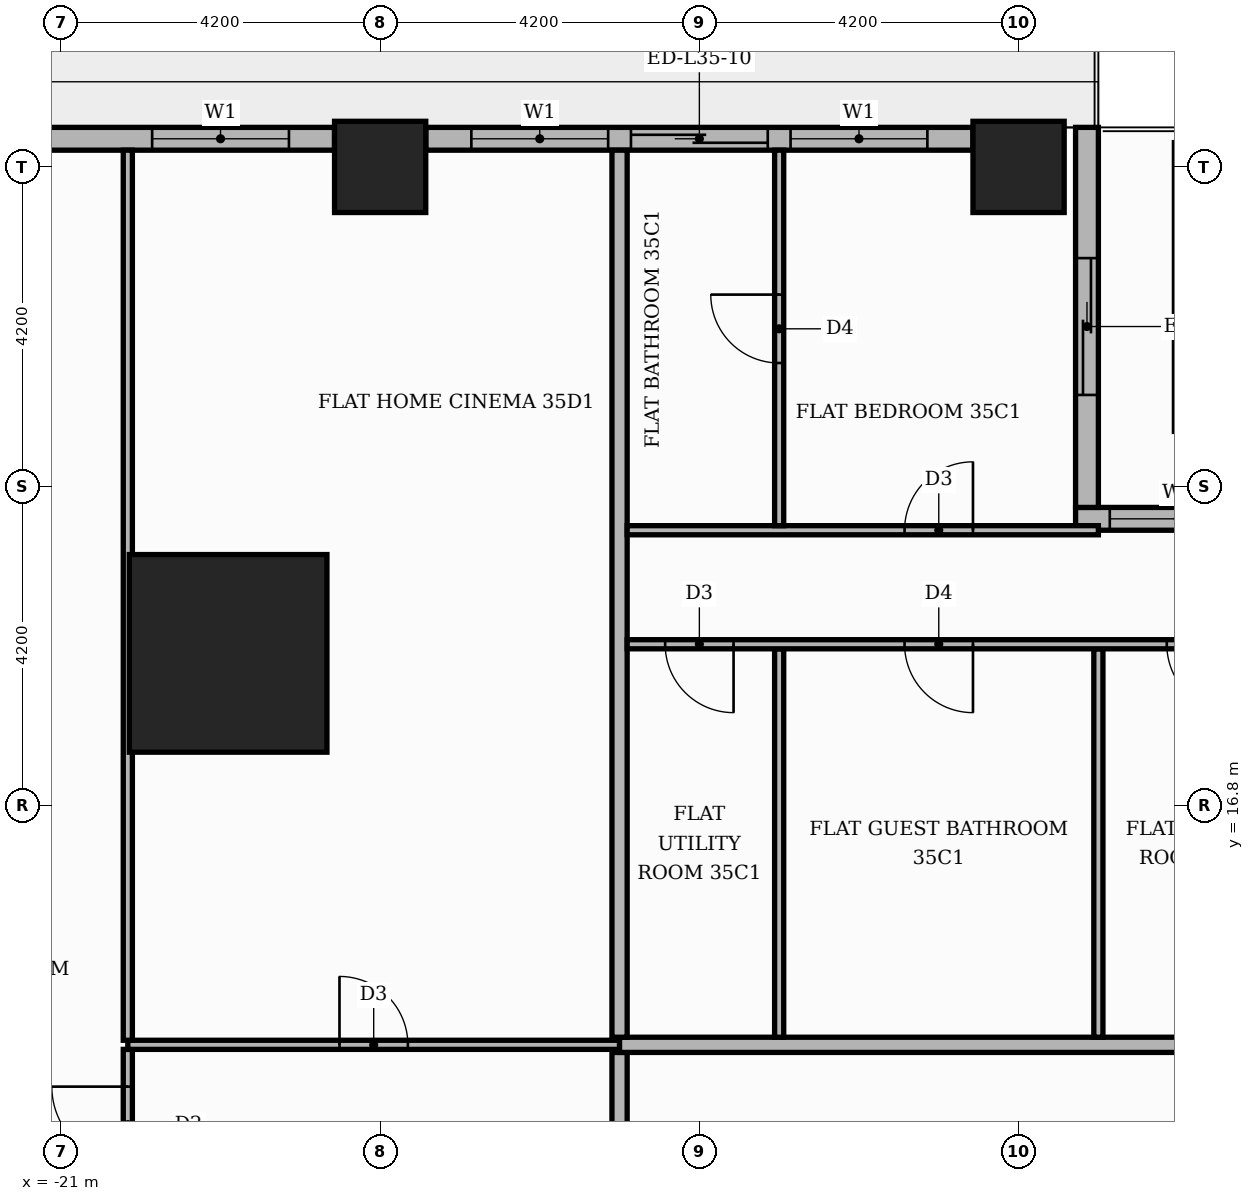
"""IFC4 building model, lengths in metres.
Left out: names, types, materials, properties, quantities, classifications, styles, units other than length and angle.
Written with IfcOpenShell. Run it as: python <this file> out.ifc"""

import sys

from ifc_helpers import new_model, si_unit, direction, frame, frame_2d, origin, origin_2d, place, context, subcontext, project, spatial, rectangle, extrude, element, fill, save


model = new_model("IFC4")
c1 = context("Model", 3, precision=1e-05, world=origin(), true_north=direction((0.0, 1.0)))
c2 = subcontext(c1, "Body", "Model", "MODEL_VIEW")
j1 = project(units=[si_unit("LENGTHUNIT", "METRE"), si_unit("PLANEANGLEUNIT", "RADIAN")], contexts=[c1])
p1 = place(None, origin())
s1 = spatial("IfcSite", under=j1, at=p1, CompositionType="ELEMENT")
p2 = place(p1, origin())
s2 = spatial("IfcBuilding", under=s1, at=p2, CompositionType="ELEMENT")
p3 = place(p2, frame((0.0, 0.0, 149.4)))
s3 = spatial("IfcBuildingStorey", under=s2, at=p3, CompositionType="ELEMENT", Elevation=149.4)
p4 = place(p3, frame((-18.8, 18.8, 0.0), z_axis=(0.0, 0.0, 1.0), x_axis=(1.0, 0.0, 0.0)))
e1 = element("IfcColumn", 1, at=p4, inside=s3, PredefinedType="COLUMN", context=c2, shape_type="SweptSolid", body=[
    extrude(rectangle(XDim=2.6, YDim=2.6, at=origin_2d()), origin(), (0.0, 0.0, 1.0), 3.9),
])
for number, where, z_axis, x_axis in (
    (2, (-8.4, 25.2, 0.0), (0.0, 0.0, 1.0), (1.0, 0.0, 0.0)),
    (3, (-16.8, 25.2, 0.0), (0.0, 0.0, 1.0), (1.0, 0.0, 0.0)),
):
    element("IfcColumn", number, at=place(p3, frame(where, z_axis=z_axis, x_axis=x_axis)), inside=s3, PredefinedType="COLUMN", context=c2, shape_type="SweptSolid", body=[
        extrude(rectangle(XDim=1.2, YDim=1.2, at=origin_2d()), origin(), (0.0, 0.0, 1.0), 3.9),
    ])
p5 = place(p3, frame((7.35, 20.57, 0.0), z_axis=(0.0, 0.0, 1.0), x_axis=(-1.0, 0.0, 0.0)))
e4 = element("IfcWall", 4, at=p5, inside=s3, PredefinedType="STANDARD", context=c2, shape_type="SweptSolid", body=[
    extrude(rectangle(XDim=15.0, YDim=0.3, at=frame_2d((7.5, 0.0))), origin(), (0.0, 0.0, 1.0), 3.48),
])
p6 = place(p5, frame((0.15, 0.0, 0.9)))
e5 = element("IfcOpeningElement", 5, at=p6, cuts=e4, PredefinedType="OPENING", context=c2, shape_type="SweptSolid", body=[
    extrude(rectangle(XDim=6.0, YDim=2.1, at=frame_2d((3.0, 1.05))), frame((0.0, 0.16, 0.0), z_axis=(0.0, -1.0, 0.0), x_axis=(1.0, 0.0, 0.0)), (0.0, 0.0, 1.0), 0.32),
])
p7 = place(p5, frame((6.45, 0.0, 0.9)))
e6 = element("IfcOpeningElement", 6, at=p7, cuts=e4, PredefinedType="OPENING", context=c2, shape_type="SweptSolid", body=[
    extrude(rectangle(XDim=6.0, YDim=2.1, at=frame_2d((3.0, 1.05))), frame((0.0, 0.16, 0.0), z_axis=(0.0, -1.0, 0.0), x_axis=(1.0, 0.0, 0.0)), (0.0, 0.0, 1.0), 0.32),
])
p8 = place(p5, frame((12.75, 0.0, 0.9)))
e7 = element("IfcOpeningElement", 7, at=p8, cuts=e4, PredefinedType="OPENING", context=c2, shape_type="SweptSolid", body=[
    extrude(rectangle(XDim=1.8, YDim=2.1, at=frame_2d((0.9, 1.05))), frame((0.0, 0.16, 0.0), z_axis=(0.0, -1.0, 0.0), x_axis=(1.0, 0.0, 0.0)), (0.0, 0.0, 1.0), 0.32),
])
p9 = place(p3, frame((-7.5, 20.72, 0.0), z_axis=(0.0, 0.0, 1.0), x_axis=(0.0, 1.0, 0.0)))
e8 = element("IfcWall", 8, at=p9, inside=s3, PredefinedType="STANDARD", context=c2, shape_type="SweptSolid", body=[
    extrude(rectangle(XDim=5.0, YDim=0.3, at=frame_2d((2.5, 0.0))), origin(), (0.0, 0.0, 1.0), 3.48),
])
p10 = place(p9, frame((1.48, 0.0, 0.0)))
e9 = element("IfcOpeningElement", 9, at=p10, cuts=e8, PredefinedType="OPENING", context=c2, shape_type="SweptSolid", body=[
    extrude(rectangle(XDim=1.8, YDim=2.4, at=frame_2d((0.9, 1.2))), frame((0.0, 0.16, 0.0), z_axis=(0.0, -1.0, 0.0), x_axis=(1.0, 0.0, 0.0)), (0.0, 0.0, 1.0), 0.32),
])
p11 = place(p3, frame((-9.0, 25.57, 0.0), z_axis=(0.0, 0.0, 1.0), x_axis=(-1.0, 0.0, 0.0)))
e10 = element("IfcWall", 10, at=p11, inside=s3, PredefinedType="STANDARD", context=c2, shape_type="SweptSolid", body=[
    extrude(rectangle(XDim=7.2, YDim=0.3, at=frame_2d((3.6, 0.0))), origin(), (0.0, 0.0, 1.0), 3.48),
])
p12 = place(p11, frame((0.6, 0.0, 0.9)))
e11 = element("IfcOpeningElement", 11, at=p12, cuts=e10, PredefinedType="OPENING", context=c2, shape_type="SweptSolid", body=[
    extrude(rectangle(XDim=1.8, YDim=2.1, at=frame_2d((0.9, 1.05))), frame((0.0, 0.16, 0.0), z_axis=(0.0, -1.0, 0.0), x_axis=(1.0, 0.0, 0.0)), (0.0, 0.0, 1.0), 0.32),
])
p13 = place(p11, frame((2.7, 0.0, 0.0)))
e12 = element("IfcOpeningElement", 12, at=p13, cuts=e10, PredefinedType="OPENING", context=c2, shape_type="SweptSolid", body=[
    extrude(rectangle(XDim=1.8, YDim=2.4, at=frame_2d((0.9, 1.2))), frame((0.0, 0.16, 0.0), z_axis=(0.0, -1.0, 0.0), x_axis=(1.0, 0.0, 0.0)), (0.0, 0.0, 1.0), 0.32),
])
p14 = place(p11, frame((4.8, 0.0, 0.9)))
e13 = element("IfcOpeningElement", 13, at=p14, cuts=e10, PredefinedType="OPENING", context=c2, shape_type="SweptSolid", body=[
    extrude(rectangle(XDim=1.8, YDim=2.1, at=frame_2d((0.9, 1.05))), frame((0.0, 0.16, 0.0), z_axis=(0.0, -1.0, 0.0), x_axis=(1.0, 0.0, 0.0)), (0.0, 0.0, 1.0), 0.32),
])
p15 = place(p3, frame((-17.4, 25.57, 0.0), z_axis=(0.0, 0.0, 1.0), x_axis=(-1.0, 0.0, 0.0)))
e14 = element("IfcWall", 14, at=p15, inside=s3, PredefinedType="STANDARD", context=c2, shape_type="SweptSolid", body=[
    extrude(rectangle(XDim=4.32, YDim=0.3, at=frame_2d((2.16, 0.0))), origin(), (0.0, 0.0, 1.0), 3.48),
])
p16 = place(p15, frame((0.6, 0.0, 0.9)))
e15 = element("IfcOpeningElement", 15, at=p16, cuts=e14, PredefinedType="OPENING", context=c2, shape_type="SweptSolid", body=[
    extrude(rectangle(XDim=1.8, YDim=2.1, at=frame_2d((0.9, 1.05))), frame((0.0, 0.16, 0.0), z_axis=(0.0, -1.0, 0.0), x_axis=(1.0, 0.0, 0.0)), (0.0, 0.0, 1.0), 0.32),
])
p17 = place(p3, frame((-13.65, 11.1, 0.0), z_axis=(0.0, 0.0, 1.0), x_axis=(0.0, 1.0, 0.0)))
e16 = element("IfcWall", 16, at=p17, inside=s3, PredefinedType="PARTITIONING", context=c2, shape_type="SweptSolid", body=[
    extrude(rectangle(XDim=2.45, YDim=0.2, at=frame_2d((1.225, 0.0))), origin(), (0.0, 0.0, 1.0), 3.48),
])
p18 = place(p3, frame((-20.12, 11.61, 0.0), z_axis=(0.0, 0.0, 1.0), x_axis=(0.0, 1.0, 0.0)))
e17 = element("IfcWall", 17, at=p18, inside=s3, PredefinedType="PARTITIONING", context=c2, shape_type="SweptSolid", body=[
    extrude(rectangle(XDim=1.98, YDim=0.12, at=frame_2d((0.99, 0.0))), origin(), (0.0, 0.0, 1.0), 3.48),
])
p19 = place(p18, frame((0.49, 0.0, 0.0)))
e18 = element("IfcOpeningElement", 18, at=p19, cuts=e17, PredefinedType="OPENING", context=c2, shape_type="SweptSolid", body=[
    extrude(rectangle(XDim=1.0, YDim=2.1, at=frame_2d((0.5, 1.05))), frame((0.0, 0.07, 0.0), z_axis=(0.0, -1.0, 0.0), x_axis=(1.0, 0.0, 0.0)), (0.0, 0.0, 1.0), 0.14),
])
p20 = place(p3, frame((-20.12, 13.65, 0.0), z_axis=(0.0, 0.0, 1.0), x_axis=(1.0, 0.0, 0.0)))
e19 = element("IfcWall", 19, at=p20, inside=s3, PredefinedType="PARTITIONING", context=c2, shape_type="SweptSolid", body=[
    extrude(rectangle(XDim=6.47, YDim=0.12, at=frame_2d((3.235, 0.0))), origin(), (0.0, 0.0, 1.0), 3.48),
])
p21 = place(p20, frame((2.785, 0.0, 0.0)))
e20 = element("IfcOpeningElement", 20, at=p21, cuts=e19, PredefinedType="OPENING", context=c2, shape_type="SweptSolid", body=[
    extrude(rectangle(XDim=0.9, YDim=2.1, at=frame_2d((0.45, 1.05))), frame((0.0, 0.07, 0.0), z_axis=(0.0, -1.0, 0.0), x_axis=(1.0, 0.0, 0.0)), (0.0, 0.0, 1.0), 0.14),
])
p22 = place(p3, frame((-13.65, 13.65, 0.0), z_axis=(0.0, 0.0, 1.0), x_axis=(1.0, 0.0, 0.0)))
e21 = element("IfcWall", 21, at=p22, inside=s3, PredefinedType="PARTITIONING", context=c2, shape_type="SweptSolid", body=[
    extrude(rectangle(XDim=39.07, YDim=0.2, at=frame_2d((19.535, 0.0))), origin(), (0.0, 0.0, 1.0), 3.48),
])
p23 = place(p22, frame((23.6, 0.0, 0.0)))
e22 = element("IfcOpeningElement", 22, at=p23, cuts=e21, PredefinedType="OPENING", context=c2, shape_type="SweptSolid", body=[
    extrude(rectangle(XDim=1.1, YDim=2.4, at=frame_2d((0.55, 1.2))), frame((0.0, 0.11, 0.0), z_axis=(0.0, -1.0, 0.0), x_axis=(1.0, 0.0, 0.0)), (0.0, 0.0, 1.0), 0.22),
])
p24 = place(p3, frame((-20.12, 13.71, 0.0), z_axis=(0.0, 0.0, 1.0), x_axis=(0.0, 1.0, 0.0)))
e23 = element("IfcWall", 23, at=p24, inside=s3, PredefinedType="PARTITIONING", context=c2, shape_type="SweptSolid", body=[
    extrude(rectangle(XDim=11.71, YDim=0.12, at=frame_2d((5.855, 0.0))), origin(), (0.0, 0.0, 1.0), 3.48),
])
p25 = place(p3, frame((-13.65, 13.75, 0.0), z_axis=(0.0, 0.0, 1.0), x_axis=(0.0, 1.0, 0.0)))
e24 = element("IfcWall", 24, at=p25, inside=s3, PredefinedType="PARTITIONING", context=c2, shape_type="SweptSolid", body=[
    extrude(rectangle(XDim=11.67, YDim=0.2, at=frame_2d((5.835, 0.0))), origin(), (0.0, 0.0, 1.0), 3.48),
])
for number, where, z_axis, x_axis in (
    (25, (-11.55, 13.75, 0.0), (0.0, 0.0, 1.0), (0.0, 1.0, 0.0)),
    (26, (-7.35, 13.75, 0.0), (0.0, 0.0, 1.0), (0.0, 1.0, 0.0)),
):
    element("IfcWall", number, at=place(p3, frame(where, z_axis=z_axis, x_axis=x_axis)), inside=s3, PredefinedType="PARTITIONING", context=c2, shape_type="SweptSolid", body=[
        extrude(rectangle(XDim=5.11, YDim=0.12, at=frame_2d((2.555, 0.0))), origin(), (0.0, 0.0, 1.0), 3.48),
    ])
p26 = place(p3, frame((-13.55, 18.92, 0.0), z_axis=(0.0, 0.0, 1.0), x_axis=(1.0, 0.0, 0.0)))
e27 = element("IfcWall", 27, at=p26, inside=s3, PredefinedType="PARTITIONING", context=c2, shape_type="SweptSolid", body=[
    extrude(rectangle(XDim=20.9, YDim=0.12, at=frame_2d((10.45, 0.0))), origin(), (0.0, 0.0, 1.0), 3.48),
])
p27 = place(p26, frame((17.3, 0.0, 0.0)))
e28 = element("IfcOpeningElement", 28, at=p27, cuts=e27, PredefinedType="OPENING", context=c2, shape_type="SweptSolid", body=[
    extrude(rectangle(XDim=0.9, YDim=2.1, at=frame_2d((0.45, 1.05))), frame((0.0, 0.07, 0.0), z_axis=(0.0, -1.0, 0.0), x_axis=(1.0, 0.0, 0.0)), (0.0, 0.0, 1.0), 0.14),
])
p28 = place(p26, frame((11.3, 0.0, 0.0)))
e29 = element("IfcOpeningElement", 29, at=p28, cuts=e27, PredefinedType="OPENING", context=c2, shape_type="SweptSolid", body=[
    extrude(rectangle(XDim=0.9, YDim=2.1, at=frame_2d((0.45, 1.05))), frame((0.0, 0.07, 0.0), z_axis=(0.0, -1.0, 0.0), x_axis=(1.0, 0.0, 0.0)), (0.0, 0.0, 1.0), 0.14),
])
p29 = place(p26, frame((7.1, 0.0, 0.0)))
e30 = element("IfcOpeningElement", 30, at=p29, cuts=e27, PredefinedType="OPENING", context=c2, shape_type="SweptSolid", body=[
    extrude(rectangle(XDim=0.9, YDim=2.1, at=frame_2d((0.45, 1.05))), frame((0.0, 0.07, 0.0), z_axis=(0.0, -1.0, 0.0), x_axis=(1.0, 0.0, 0.0)), (0.0, 0.0, 1.0), 0.14),
])
p30 = place(p26, frame((3.65, 0.0, 0.0)))
e31 = element("IfcOpeningElement", 31, at=p30, cuts=e27, PredefinedType="OPENING", context=c2, shape_type="SweptSolid", body=[
    extrude(rectangle(XDim=0.9, YDim=2.1, at=frame_2d((0.45, 1.05))), frame((0.0, 0.07, 0.0), z_axis=(0.0, -1.0, 0.0), x_axis=(1.0, 0.0, 0.0)), (0.0, 0.0, 1.0), 0.14),
])
p31 = place(p26, frame((0.5, 0.0, 0.0)))
e32 = element("IfcOpeningElement", 32, at=p31, cuts=e27, PredefinedType="OPENING", context=c2, shape_type="SweptSolid", body=[
    extrude(rectangle(XDim=0.9, YDim=2.1, at=frame_2d((0.45, 1.05))), frame((0.0, 0.07, 0.0), z_axis=(0.0, -1.0, 0.0), x_axis=(1.0, 0.0, 0.0)), (0.0, 0.0, 1.0), 0.14),
])
p32 = place(p3, frame((-13.55, 20.42, 0.0), z_axis=(0.0, 0.0, 1.0), x_axis=(1.0, 0.0, 0.0)))
e33 = element("IfcWall", 33, at=p32, inside=s3, PredefinedType="PARTITIONING", context=c2, shape_type="SweptSolid", body=[
    extrude(rectangle(XDim=6.2, YDim=0.12, at=frame_2d((3.1, 0.0))), origin(), (0.0, 0.0, 1.0), 3.48),
])
p33 = place(p32, frame((3.65, 0.0, 0.0)))
e34 = element("IfcOpeningElement", 34, at=p33, cuts=e33, PredefinedType="OPENING", context=c2, shape_type="SweptSolid", body=[
    extrude(rectangle(XDim=0.9, YDim=2.1, at=frame_2d((0.45, 1.05))), frame((0.0, 0.07, 0.0), z_axis=(0.0, -1.0, 0.0), x_axis=(1.0, 0.0, 0.0)), (0.0, 0.0, 1.0), 0.14),
])
p34 = place(p3, frame((-11.55, 20.48, 0.0), z_axis=(0.0, 0.0, 1.0), x_axis=(0.0, 1.0, 0.0)))
e35 = element("IfcWall", 35, at=p34, inside=s3, PredefinedType="PARTITIONING", context=c2, shape_type="SweptSolid", body=[
    extrude(rectangle(XDim=4.94, YDim=0.12, at=frame_2d((2.47, 0.0))), origin(), (0.0, 0.0, 1.0), 3.48),
])
p35 = place(p34, frame((2.14, 0.0, 0.0)))
e36 = element("IfcOpeningElement", 36, at=p35, cuts=e35, PredefinedType="OPENING", context=c2, shape_type="SweptSolid", body=[
    extrude(rectangle(XDim=0.9, YDim=2.1, at=frame_2d((0.45, 1.05))), frame((0.0, 0.07, 0.0), z_axis=(0.0, -1.0, 0.0), x_axis=(1.0, 0.0, 0.0)), (0.0, 0.0, 1.0), 0.14),
])
p36 = place(p8, origin())
e37 = element("IfcWindow", 37, at=p36, inside=s3, PartitioningType="SINGLE_PANEL", PredefinedType="WINDOW", context=c2, shape_type="SweptSolid", body=[
    extrude(rectangle(XDim=1.8, YDim=2.1, at=frame_2d((0.9, 1.05))), frame((0.0, 0.03, 0.0), z_axis=(0.0, -1.0, 0.0), x_axis=(1.0, 0.0, 0.0)), (0.0, 0.0, 1.0), 0.06),
])
fill(e7, e37)
p37 = place(p10, origin())
e38 = element("IfcDoor", 38, at=p37, inside=s3, OperationType="SLIDING_TO_RIGHT", PredefinedType="DOOR", context=c2, shape_type="SweptSolid", body=[
    extrude(rectangle(XDim=1.8, YDim=2.4, at=frame_2d((0.9, 1.2))), frame((0.0, 0.025, 0.0), z_axis=(0.0, -1.0, 0.0), x_axis=(1.0, 0.0, 0.0)), (0.0, 0.0, 1.0), 0.05),
])
fill(e9, e38)
p38 = place(p12, origin())
e39 = element("IfcWindow", 39, at=p38, inside=s3, PartitioningType="SINGLE_PANEL", PredefinedType="WINDOW", context=c2, shape_type="SweptSolid", body=[
    extrude(rectangle(XDim=1.8, YDim=2.1, at=frame_2d((0.9, 1.05))), frame((0.0, 0.03, 0.0), z_axis=(0.0, -1.0, 0.0), x_axis=(1.0, 0.0, 0.0)), (0.0, 0.0, 1.0), 0.06),
])
fill(e11, e39)
p39 = place(p13, origin())
e40 = element("IfcDoor", 40, at=p39, inside=s3, OperationType="SLIDING_TO_RIGHT", PredefinedType="DOOR", context=c2, shape_type="SweptSolid", body=[
    extrude(rectangle(XDim=1.8, YDim=2.4, at=frame_2d((0.9, 1.2))), frame((0.0, 0.025, 0.0), z_axis=(0.0, -1.0, 0.0), x_axis=(1.0, 0.0, 0.0)), (0.0, 0.0, 1.0), 0.05),
])
fill(e12, e40)
p40 = place(p14, origin())
e41 = element("IfcWindow", 41, at=p40, inside=s3, PartitioningType="SINGLE_PANEL", PredefinedType="WINDOW", context=c2, shape_type="SweptSolid", body=[
    extrude(rectangle(XDim=1.8, YDim=2.1, at=frame_2d((0.9, 1.05))), frame((0.0, 0.03, 0.0), z_axis=(0.0, -1.0, 0.0), x_axis=(1.0, 0.0, 0.0)), (0.0, 0.0, 1.0), 0.06),
])
fill(e13, e41)
p41 = place(p16, origin())
e42 = element("IfcWindow", 42, at=p41, inside=s3, PartitioningType="SINGLE_PANEL", PredefinedType="WINDOW", context=c2, shape_type="SweptSolid", body=[
    extrude(rectangle(XDim=1.8, YDim=2.1, at=frame_2d((0.9, 1.05))), frame((0.0, 0.03, 0.0), z_axis=(0.0, -1.0, 0.0), x_axis=(1.0, 0.0, 0.0)), (0.0, 0.0, 1.0), 0.06),
])
fill(e15, e42)
p42 = place(p29, frame((0.9, 0.0, 0.0), z_axis=(0.0, 0.0, 1.0), x_axis=(-1.0, 0.0, 0.0)))
e43 = element("IfcDoor", 43, at=p42, inside=s3, OperationType="SINGLE_SWING_RIGHT", PredefinedType="DOOR", context=c2, shape_type="SweptSolid", body=[
    extrude(rectangle(XDim=0.9, YDim=2.1, at=frame_2d((0.45, 1.05))), frame((0.0, 0.025, 0.0), z_axis=(0.0, -1.0, 0.0), x_axis=(1.0, 0.0, 0.0)), (0.0, 0.0, 1.0), 0.05),
])
fill(e30, e43)
p43 = place(p30, frame((0.9, 0.0, 0.0), z_axis=(0.0, 0.0, 1.0), x_axis=(-1.0, 0.0, 0.0)))
e44 = element("IfcDoor", 44, at=p43, inside=s3, OperationType="SINGLE_SWING_RIGHT", PredefinedType="DOOR", context=c2, shape_type="SweptSolid", body=[
    extrude(rectangle(XDim=0.9, YDim=2.1, at=frame_2d((0.45, 1.05))), frame((0.0, 0.025, 0.0), z_axis=(0.0, -1.0, 0.0), x_axis=(1.0, 0.0, 0.0)), (0.0, 0.0, 1.0), 0.05),
])
fill(e31, e44)
p44 = place(p31, frame((0.9, 0.0, 0.0), z_axis=(0.0, 0.0, 1.0), x_axis=(-1.0, 0.0, 0.0)))
e45 = element("IfcDoor", 45, at=p44, inside=s3, OperationType="SINGLE_SWING_RIGHT", PredefinedType="DOOR", context=c2, shape_type="SweptSolid", body=[
    extrude(rectangle(XDim=0.9, YDim=2.1, at=frame_2d((0.45, 1.05))), frame((0.0, 0.025, 0.0), z_axis=(0.0, -1.0, 0.0), x_axis=(1.0, 0.0, 0.0)), (0.0, 0.0, 1.0), 0.05),
])
fill(e32, e45)
p45 = place(p33, origin())
e46 = element("IfcDoor", 46, at=p45, inside=s3, OperationType="SINGLE_SWING_RIGHT", PredefinedType="DOOR", context=c2, shape_type="SweptSolid", body=[
    extrude(rectangle(XDim=0.9, YDim=2.1, at=frame_2d((0.45, 1.05))), frame((0.0, 0.025, 0.0), z_axis=(0.0, -1.0, 0.0), x_axis=(1.0, 0.0, 0.0)), (0.0, 0.0, 1.0), 0.05),
])
fill(e34, e46)
p46 = place(p35, origin())
e47 = element("IfcDoor", 47, at=p46, inside=s3, OperationType="SINGLE_SWING_RIGHT", PredefinedType="DOOR", context=c2, shape_type="SweptSolid", body=[
    extrude(rectangle(XDim=0.9, YDim=2.1, at=frame_2d((0.45, 1.05))), frame((0.0, 0.025, 0.0), z_axis=(0.0, -1.0, 0.0), x_axis=(1.0, 0.0, 0.0)), (0.0, 0.0, 1.0), 0.05),
])
fill(e36, e47)
p47 = place(p21, origin())
e48 = element("IfcDoor", 48, at=p47, inside=s3, OperationType="SINGLE_SWING_LEFT", PredefinedType="DOOR", context=c2, shape_type="SweptSolid", body=[
    extrude(rectangle(XDim=0.9, YDim=2.1, at=frame_2d((0.45, 1.05))), frame((0.0, 0.025, 0.0), z_axis=(0.0, -1.0, 0.0), x_axis=(1.0, 0.0, 0.0)), (0.0, 0.0, 1.0), 0.05),
])
fill(e20, e48)
p48 = place(p19, origin())
e49 = element("IfcDoor", 49, at=p48, inside=s3, OperationType="SINGLE_SWING_RIGHT", PredefinedType="DOOR", context=c2, shape_type="SweptSolid", body=[
    extrude(rectangle(XDim=1.0, YDim=2.1, at=frame_2d((0.5, 1.05))), frame((0.0, 0.025, 0.0), z_axis=(0.0, -1.0, 0.0), x_axis=(1.0, 0.0, 0.0)), (0.0, 0.0, 1.0), 0.05),
])
fill(e18, e49)
save(model, sys.argv[1])
